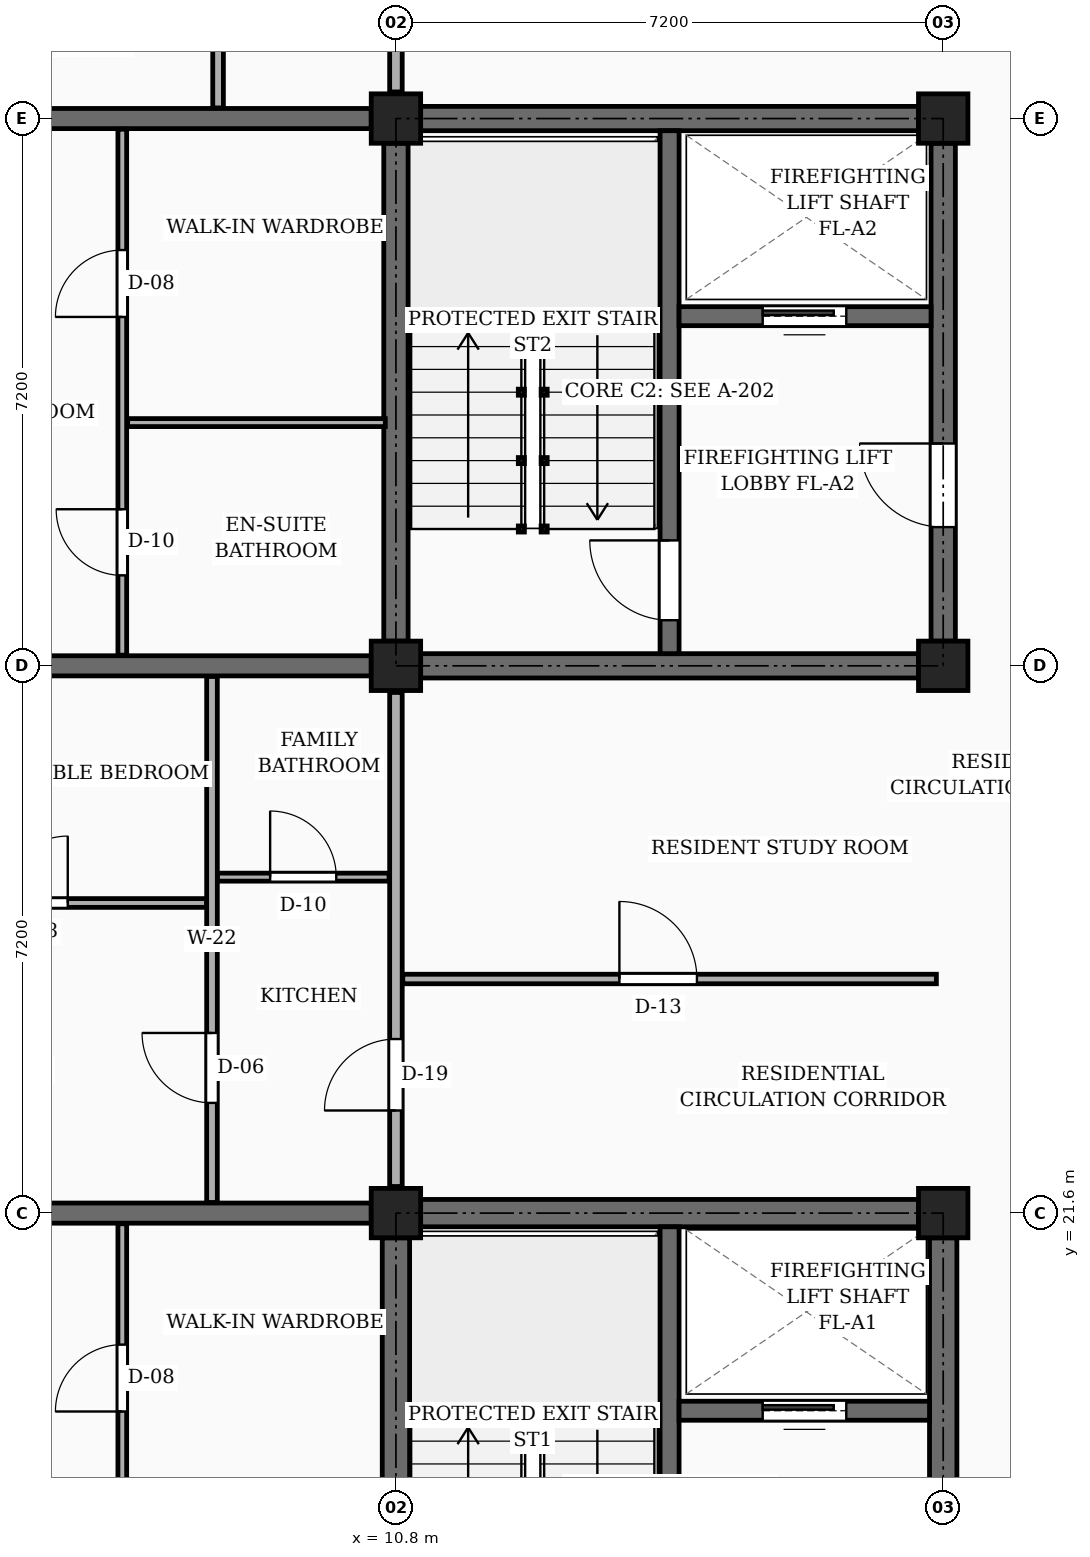
"""IFC4 building model, lengths in metres.
Left out: names, types, materials, properties, quantities, classifications, styles, units other than length and angle.
Written with IfcOpenShell. Run it as: python <this file> out.ifc"""

import sys

from ifc_helpers import new_model, si_unit, direction, frame, frame_2d, origin, origin_2d, place, context, subcontext, project, spatial, rectangle, extrude, element, fill, save


model = new_model("IFC4")
c1 = context("Model", 3, precision=1e-05, world=origin(), true_north=direction((0.0, 1.0)))
c2 = subcontext(c1, "Body", "Model", "MODEL_VIEW")
j1 = project(units=[si_unit("LENGTHUNIT", "METRE"), si_unit("PLANEANGLEUNIT", "RADIAN")], contexts=[c1])
p1 = place(None, origin())
s1 = spatial("IfcSite", under=j1, at=p1, CompositionType="ELEMENT")
p2 = place(p1, origin())
s2 = spatial("IfcBuilding", under=s1, at=p2, CompositionType="ELEMENT")
p3 = place(p2, frame((0.0, 0.0, 7.65)))
s3 = spatial("IfcBuildingStorey", under=s2, at=p3, CompositionType="ELEMENT", Elevation=7.65)
for number, where, z_axis, x_axis in (
    (1, (10.8, 21.6, 0.0), (0.0, 0.0, 1.0), (1.0, 0.0, 0.0)),
    (2, (10.8, 28.8, 0.0), (0.0, 0.0, 1.0), (1.0, 0.0, 0.0)),
    (3, (10.8, 36.0, 0.0), (0.0, 0.0, 1.0), (1.0, 0.0, 0.0)),
    (4, (18.0, 21.6, 0.0), (0.0, 0.0, 1.0), (1.0, 0.0, 0.0)),
    (5, (18.0, 28.8, 0.0), (0.0, 0.0, 1.0), (1.0, 0.0, 0.0)),
    (6, (18.0, 36.0, 0.0), (0.0, 0.0, 1.0), (1.0, 0.0, 0.0)),
):
    element("IfcColumn", number, at=place(p3, frame(where, z_axis=z_axis, x_axis=x_axis)), inside=s3, PredefinedType="COLUMN", context=c2, shape_type="SweptSolid", body=[
        extrude(rectangle(XDim=0.65, YDim=0.65, at=origin_2d()), origin(), (0.0, 0.0, 1.0), 3.15),
    ])
p4 = place(p3, frame((3.9, 21.6, 0.0), z_axis=(0.0, 0.0, 1.0), x_axis=(1.0, 0.0, 0.0)))
e7 = element("IfcWall", 7, at=p4, inside=s3, PredefinedType="SOLIDWALL", context=c2, shape_type="SweptSolid", body=[
    extrude(rectangle(XDim=6.575, YDim=0.265, at=frame_2d((3.288, 0.0))), origin(), (0.0, 0.0, 1.0), 2.17),
])
p5 = place(p3, frame((3.9, 28.8, 0.0), z_axis=(0.0, 0.0, 1.0), x_axis=(1.0, 0.0, 0.0)))
e8 = element("IfcWall", 8, at=p5, inside=s3, PredefinedType="SOLIDWALL", context=c2, shape_type="SweptSolid", body=[
    extrude(rectangle(XDim=6.575, YDim=0.265, at=frame_2d((3.288, 0.0))), origin(), (0.0, 0.0, 1.0), 2.17),
])
p6 = place(p5, frame((1.35, 0.0, 0.0)))
e9 = element("IfcOpeningElement", 9, at=p6, cuts=e8, PredefinedType="OPENING", context=c2, shape_type="SweptSolid", body=[
    extrude(rectangle(XDim=0.98, YDim=2.12, at=frame_2d((0.49, 1.06))), frame((0.0, 0.143, 0.0), z_axis=(0.0, -1.0, 0.0), x_axis=(1.0, 0.0, 0.0)), (0.0, 0.0, 1.0), 0.285),
])
p7 = place(p3, frame((3.9, 36.0, 0.0), z_axis=(0.0, 0.0, 1.0), x_axis=(1.0, 0.0, 0.0)))
e10 = element("IfcWall", 10, at=p7, inside=s3, PredefinedType="SOLIDWALL", context=c2, shape_type="SweptSolid", body=[
    extrude(rectangle(XDim=6.575, YDim=0.265, at=frame_2d((3.288, 0.0))), origin(), (0.0, 0.0, 1.0), 2.17),
])
p8 = place(p3, frame((10.8, 14.725, 0.0), z_axis=(0.0, 0.0, 1.0), x_axis=(0.0, 1.0, 0.0)))
e11 = element("IfcWall", 11, at=p8, inside=s3, PredefinedType="SHEAR", context=c2, shape_type="SweptSolid", body=[
    extrude(rectangle(XDim=6.55, YDim=0.36, at=frame_2d((3.275, 0.0))), origin(), (0.0, 0.0, 1.0), 2.87),
])
p9 = place(p3, frame((11.125, 21.6, 0.0), z_axis=(0.0, 0.0, 1.0), x_axis=(1.0, 0.0, 0.0)))
e12 = element("IfcWall", 12, at=p9, inside=s3, PredefinedType="SHEAR", context=c2, shape_type="SweptSolid", body=[
    extrude(rectangle(XDim=6.55, YDim=0.36, at=frame_2d((3.275, 0.0))), origin(), (0.0, 0.0, 1.0), 2.87),
])
p10 = place(p3, frame((18.0, 14.725, 0.0), z_axis=(0.0, 0.0, 1.0), x_axis=(0.0, 1.0, 0.0)))
e13 = element("IfcWall", 13, at=p10, inside=s3, PredefinedType="SHEAR", context=c2, shape_type="SweptSolid", body=[
    extrude(rectangle(XDim=6.55, YDim=0.36, at=frame_2d((3.275, 0.0))), origin(), (0.0, 0.0, 1.0), 2.87),
])
p11 = place(p10, frame((1.5, 0.0, 0.0)))
e14 = element("IfcOpeningElement", 14, at=p11, cuts=e13, PredefinedType="OPENING", context=c2, shape_type="SweptSolid", body=[
    extrude(rectangle(XDim=1.1, YDim=2.15, at=frame_2d((0.55, 1.075))), frame((0.0, 0.19, 0.0), z_axis=(0.0, -1.0, 0.0), x_axis=(1.0, 0.0, 0.0)), (0.0, 0.0, 1.0), 0.38),
])
p12 = place(p3, frame((14.4, 14.58, 0.0), z_axis=(0.0, 0.0, 1.0), x_axis=(0.0, 1.0, 0.0)))
e15 = element("IfcWall", 15, at=p12, inside=s3, PredefinedType="SHEAR", context=c2, shape_type="SweptSolid", body=[
    extrude(rectangle(XDim=6.84, YDim=0.25, at=frame_2d((3.42, 0.0))), origin(), (0.0, 0.0, 1.0), 2.87),
])
p13 = place(p12, frame((0.42, 0.0, 0.0)))
e16 = element("IfcOpeningElement", 16, at=p13, cuts=e15, PredefinedType="OPENING", context=c2, shape_type="SweptSolid", body=[
    extrude(rectangle(XDim=1.05, YDim=2.15, at=frame_2d((0.525, 1.075))), frame((0.0, 0.135, 0.0), z_axis=(0.0, -1.0, 0.0), x_axis=(1.0, 0.0, 0.0)), (0.0, 0.0, 1.0), 0.27),
])
p14 = place(p3, frame((14.525, 19.0, 0.0), z_axis=(0.0, 0.0, 1.0), x_axis=(1.0, 0.0, 0.0)))
e17 = element("IfcWall", 17, at=p14, inside=s3, PredefinedType="SHEAR", context=c2, shape_type="SweptSolid", body=[
    extrude(rectangle(XDim=3.295, YDim=0.25, at=frame_2d((1.647, 0.0))), origin(), (0.0, 0.0, 1.0), 2.87),
])
p15 = place(p14, frame((1.1, 0.0, 0.0)))
e18 = element("IfcOpeningElement", 18, at=p15, cuts=e17, PredefinedType="OPENING", context=c2, shape_type="SweptSolid", body=[
    extrude(rectangle(XDim=1.1, YDim=2.2, at=frame_2d((0.55, 1.1))), frame((0.0, 0.135, 0.0), z_axis=(0.0, -1.0, 0.0), x_axis=(1.0, 0.0, 0.0)), (0.0, 0.0, 1.0), 0.27),
])
for number, where, z_axis, x_axis in (
    (19, (10.8, 29.125, 0.0), (0.0, 0.0, 1.0), (0.0, 1.0, 0.0)),
    (20, (11.125, 36.0, 0.0), (0.0, 0.0, 1.0), (1.0, 0.0, 0.0)),
):
    element("IfcWall", number, at=place(p3, frame(where, z_axis=z_axis, x_axis=x_axis)), inside=s3, PredefinedType="SHEAR", context=c2, shape_type="SweptSolid", body=[
        extrude(rectangle(XDim=6.55, YDim=0.32, at=frame_2d((3.275, 0.0))), origin(), (0.0, 0.0, 1.0), 2.87),
    ])
p16 = place(p3, frame((18.0, 29.125, 0.0), z_axis=(0.0, 0.0, 1.0), x_axis=(0.0, 1.0, 0.0)))
e21 = element("IfcWall", 21, at=p16, inside=s3, PredefinedType="SHEAR", context=c2, shape_type="SweptSolid", body=[
    extrude(rectangle(XDim=6.55, YDim=0.32, at=frame_2d((3.275, 0.0))), origin(), (0.0, 0.0, 1.0), 2.87),
])
p17 = place(p16, frame((1.5, 0.0, 0.0)))
e22 = element("IfcOpeningElement", 22, at=p17, cuts=e21, PredefinedType="OPENING", context=c2, shape_type="SweptSolid", body=[
    extrude(rectangle(XDim=1.1, YDim=2.15, at=frame_2d((0.55, 1.075))), frame((0.0, 0.17, 0.0), z_axis=(0.0, -1.0, 0.0), x_axis=(1.0, 0.0, 0.0)), (0.0, 0.0, 1.0), 0.34),
])
p18 = place(p3, frame((11.125, 28.8, 0.0), z_axis=(0.0, 0.0, 1.0), x_axis=(1.0, 0.0, 0.0)))
e23 = element("IfcWall", 23, at=p18, inside=s3, PredefinedType="SHEAR", context=c2, shape_type="SweptSolid", body=[
    extrude(rectangle(XDim=6.55, YDim=0.32, at=frame_2d((3.275, 0.0))), origin(), (0.0, 0.0, 1.0), 2.87),
])
p19 = place(p3, frame((14.4, 28.96, 0.0), z_axis=(0.0, 0.0, 1.0), x_axis=(0.0, 1.0, 0.0)))
e24 = element("IfcWall", 24, at=p19, inside=s3, PredefinedType="SHEAR", context=c2, shape_type="SweptSolid", body=[
    extrude(rectangle(XDim=6.88, YDim=0.25, at=frame_2d((3.44, 0.0))), origin(), (0.0, 0.0, 1.0), 2.87),
])
p20 = place(p19, frame((0.44, 0.0, 0.0)))
e25 = element("IfcOpeningElement", 25, at=p20, cuts=e24, PredefinedType="OPENING", context=c2, shape_type="SweptSolid", body=[
    extrude(rectangle(XDim=1.05, YDim=2.15, at=frame_2d((0.525, 1.075))), frame((0.0, 0.135, 0.0), z_axis=(0.0, -1.0, 0.0), x_axis=(1.0, 0.0, 0.0)), (0.0, 0.0, 1.0), 0.27),
])
p21 = place(p3, frame((14.525, 33.4, 0.0), z_axis=(0.0, 0.0, 1.0), x_axis=(1.0, 0.0, 0.0)))
e26 = element("IfcWall", 26, at=p21, inside=s3, PredefinedType="SHEAR", context=c2, shape_type="SweptSolid", body=[
    extrude(rectangle(XDim=3.315, YDim=0.25, at=frame_2d((1.658, 0.0))), origin(), (0.0, 0.0, 1.0), 2.87),
])
p22 = place(p21, frame((1.1, 0.0, 0.0)))
e27 = element("IfcOpeningElement", 27, at=p22, cuts=e26, PredefinedType="OPENING", context=c2, shape_type="SweptSolid", body=[
    extrude(rectangle(XDim=1.1, YDim=2.2, at=frame_2d((0.55, 1.1))), frame((0.0, 0.135, 0.0), z_axis=(0.0, -1.0, 0.0), x_axis=(1.0, 0.0, 0.0)), (0.0, 0.0, 1.0), 0.27),
])
p23 = place(p3, frame((10.8, 21.95, 0.0), z_axis=(0.0, 0.0, 1.0), x_axis=(0.0, 1.0, 0.0)))
e28 = element("IfcWall", 28, at=p23, inside=s3, PredefinedType="PARTITIONING", context=c2, shape_type="SweptSolid", body=[
    extrude(rectangle(XDim=6.5, YDim=0.165, at=frame_2d((3.25, 0.0))), origin(), (0.0, 0.0, 1.0), 2.22),
])
p24 = place(p23, frame((1.0, 0.0, 0.0)))
e29 = element("IfcOpeningElement", 29, at=p24, cuts=e28, PredefinedType="OPENING", context=c2, shape_type="SweptSolid", body=[
    extrude(rectangle(XDim=0.94, YDim=2.12, at=frame_2d((0.47, 1.06))), frame((0.0, 0.093, 0.0), z_axis=(0.0, -1.0, 0.0), x_axis=(1.0, 0.0, 0.0)), (0.0, 0.0, 1.0), 0.185),
])
p25 = place(p3, frame((10.8, 36.35, 0.0), z_axis=(0.0, 0.0, 1.0), x_axis=(0.0, 1.0, 0.0)))
e30 = element("IfcWall", 30, at=p25, inside=s3, PredefinedType="PARTITIONING", context=c2, shape_type="SweptSolid", body=[
    extrude(rectangle(XDim=6.5, YDim=0.165, at=frame_2d((3.25, 0.0))), origin(), (0.0, 0.0, 1.0), 2.22),
])
p26 = place(p25, frame((1.0, 0.0, 0.0)))
e31 = element("IfcOpeningElement", 31, at=p26, cuts=e30, PredefinedType="OPENING", context=c2, shape_type="SweptSolid", body=[
    extrude(rectangle(XDim=1.14, YDim=2.18, at=frame_2d((0.57, 1.09))), frame((0.0, 0.093, 0.0), z_axis=(0.0, -1.0, 0.0), x_axis=(1.0, 0.0, 0.0)), (0.0, 0.0, 1.0), 0.185),
])
p27 = place(p3, frame((7.2, 14.54, 0.0), z_axis=(0.0, 0.0, 1.0), x_axis=(0.0, 1.0, 0.0)))
e32 = element("IfcWall", 32, at=p27, inside=s3, PredefinedType="PARTITIONING", context=c2, shape_type="SweptSolid", body=[
    extrude(rectangle(XDim=6.92, YDim=0.115, at=frame_2d((3.46, 0.0))), origin(), (0.0, 0.0, 1.0), 2.305),
])
p28 = place(p27, frame((1.05, 0.0, 0.0)))
e33 = element("IfcOpeningElement", 33, at=p28, cuts=e32, PredefinedType="OPENING", context=c2, shape_type="SweptSolid", body=[
    extrude(rectangle(XDim=0.87, YDim=2.05, at=frame_2d((0.435, 1.025))), frame((0.0, 0.067, 0.0), z_axis=(0.0, -1.0, 0.0), x_axis=(1.0, 0.0, 0.0)), (0.0, 0.0, 1.0), 0.135),
])
p29 = place(p27, frame((4.45, 0.0, 0.0)))
e34 = element("IfcOpeningElement", 34, at=p29, cuts=e32, PredefinedType="OPENING", context=c2, shape_type="SweptSolid", body=[
    extrude(rectangle(XDim=0.88, YDim=2.08, at=frame_2d((0.44, 1.04))), frame((0.0, 0.067, 0.0), z_axis=(0.0, -1.0, 0.0), x_axis=(1.0, 0.0, 0.0)), (0.0, 0.0, 1.0), 0.135),
])
p30 = place(p3, frame((10.89, 24.68, 0.0), z_axis=(0.0, 0.0, 1.0), x_axis=(1.0, 0.0, 0.0)))
e35 = element("IfcWall", 35, at=p30, inside=s3, PredefinedType="PARTITIONING", context=c2, shape_type="SweptSolid", body=[
    extrude(rectangle(XDim=7.02, YDim=0.125, at=frame_2d((3.51, 0.0))), origin(), (0.0, 0.0, 1.0), 2.305),
])
p31 = place(p30, frame((2.85, 0.0, 0.0)))
e36 = element("IfcOpeningElement", 36, at=p31, cuts=e35, PredefinedType="OPENING", context=c2, shape_type="SweptSolid", body=[
    extrude(rectangle(XDim=1.02, YDim=2.15, at=frame_2d((0.51, 1.075))), frame((0.0, 0.073, 0.0), z_axis=(0.0, -1.0, 0.0), x_axis=(1.0, 0.0, 0.0)), (0.0, 0.0, 1.0), 0.145),
])
p32 = place(p3, frame((3.775, 25.68, 0.0), z_axis=(0.0, 0.0, 1.0), x_axis=(1.0, 0.0, 0.0)))
e37 = element("IfcWall", 37, at=p32, inside=s3, PredefinedType="PARTITIONING", context=c2, shape_type="SweptSolid", body=[
    extrude(rectangle(XDim=4.535, YDim=0.115, at=frame_2d((2.268, 0.0))), origin(), (0.0, 0.0, 1.0), 2.305),
])
p33 = place(p32, frame((1.827, 0.0, 0.0)))
e38 = element("IfcOpeningElement", 38, at=p33, cuts=e37, PredefinedType="OPENING", context=c2, shape_type="SweptSolid", body=[
    extrude(rectangle(XDim=0.88, YDim=2.08, at=frame_2d((0.44, 1.04))), frame((0.0, 0.067, 0.0), z_axis=(0.0, -1.0, 0.0), x_axis=(1.0, 0.0, 0.0)), (0.0, 0.0, 1.0), 0.135),
])
p34 = place(p3, frame((8.45, 26.02, 0.0), z_axis=(0.0, 0.0, 1.0), x_axis=(1.0, 0.0, 0.0)))
e39 = element("IfcWall", 39, at=p34, inside=s3, PredefinedType="PARTITIONING", context=c2, shape_type="SweptSolid", body=[
    extrude(rectangle(XDim=2.26, YDim=0.105, at=frame_2d((1.13, 0.0))), origin(), (0.0, 0.0, 1.0), 2.305),
])
p35 = place(p34, frame((0.695, 0.0, 0.0)))
e40 = element("IfcOpeningElement", 40, at=p35, cuts=e39, PredefinedType="OPENING", context=c2, shape_type="SweptSolid", body=[
    extrude(rectangle(XDim=0.87, YDim=2.05, at=frame_2d((0.435, 1.025))), frame((0.0, 0.062, 0.0), z_axis=(0.0, -1.0, 0.0), x_axis=(1.0, 0.0, 0.0)), (0.0, 0.0, 1.0), 0.125),
])
p36 = place(p3, frame((8.38, 21.74, 0.0), z_axis=(0.0, 0.0, 1.0), x_axis=(0.0, 1.0, 0.0)))
e41 = element("IfcWall", 41, at=p36, inside=s3, PredefinedType="PARTITIONING", context=c2, shape_type="SweptSolid", body=[
    extrude(rectangle(XDim=6.92, YDim=0.14, at=frame_2d((3.46, 0.0))), origin(), (0.0, 0.0, 1.0), 2.305),
])
p37 = place(p36, frame((1.31, 0.0, 0.0)))
e42 = element("IfcOpeningElement", 42, at=p37, cuts=e41, PredefinedType="OPENING", context=c2, shape_type="SweptSolid", body=[
    extrude(rectangle(XDim=0.92, YDim=2.1, at=frame_2d((0.46, 1.05))), frame((0.0, 0.08, 0.0), z_axis=(0.0, -1.0, 0.0), x_axis=(1.0, 0.0, 0.0)), (0.0, 0.0, 1.0), 0.16),
])
p38 = place(p3, frame((7.2, 28.94, 0.0), z_axis=(0.0, 0.0, 1.0), x_axis=(0.0, 1.0, 0.0)))
e43 = element("IfcWall", 43, at=p38, inside=s3, PredefinedType="PARTITIONING", context=c2, shape_type="SweptSolid", body=[
    extrude(rectangle(XDim=6.92, YDim=0.115, at=frame_2d((3.46, 0.0))), origin(), (0.0, 0.0, 1.0), 2.305),
])
p39 = place(p38, frame((1.05, 0.0, 0.0)))
e44 = element("IfcOpeningElement", 44, at=p39, cuts=e43, PredefinedType="OPENING", context=c2, shape_type="SweptSolid", body=[
    extrude(rectangle(XDim=0.87, YDim=2.05, at=frame_2d((0.435, 1.025))), frame((0.0, 0.067, 0.0), z_axis=(0.0, -1.0, 0.0), x_axis=(1.0, 0.0, 0.0)), (0.0, 0.0, 1.0), 0.135),
])
p40 = place(p38, frame((4.45, 0.0, 0.0)))
e45 = element("IfcOpeningElement", 45, at=p40, cuts=e43, PredefinedType="OPENING", context=c2, shape_type="SweptSolid", body=[
    extrude(rectangle(XDim=0.88, YDim=2.08, at=frame_2d((0.44, 1.04))), frame((0.0, 0.067, 0.0), z_axis=(0.0, -1.0, 0.0), x_axis=(1.0, 0.0, 0.0)), (0.0, 0.0, 1.0), 0.135),
])
p41 = place(p3, frame((7.27, 32.0, 0.0), z_axis=(0.0, 0.0, 1.0), x_axis=(1.0, 0.0, 0.0)))
e46 = element("IfcWall", 46, at=p41, inside=s3, PredefinedType="PARTITIONING", context=c2, shape_type="SweptSolid", body=[
    extrude(rectangle(XDim=3.39, YDim=0.105, at=frame_2d((1.695, 0.0))), origin(), (0.0, 0.0, 1.0), 2.305),
])
p42 = place(p3, frame((8.46, 36.14, 0.0), z_axis=(0.0, 0.0, 1.0), x_axis=(0.0, 1.0, 0.0)))
e47 = element("IfcWall", 47, at=p42, inside=s3, PredefinedType="PARTITIONING", context=c2, shape_type="SweptSolid", body=[
    extrude(rectangle(XDim=6.92, YDim=0.14, at=frame_2d((3.46, 0.0))), origin(), (0.0, 0.0, 1.0), 2.305),
])
p43 = place(p42, frame((1.31, 0.0, 0.0)))
e48 = element("IfcOpeningElement", 48, at=p43, cuts=e47, PredefinedType="OPENING", context=c2, shape_type="SweptSolid", body=[
    extrude(rectangle(XDim=0.92, YDim=2.1, at=frame_2d((0.46, 1.05))), frame((0.0, 0.08, 0.0), z_axis=(0.0, -1.0, 0.0), x_axis=(1.0, 0.0, 0.0)), (0.0, 0.0, 1.0), 0.16),
])
p44 = place(p15, origin())
e49 = element("IfcDoor", 49, at=p44, inside=s3, OperationType="SLIDING_TO_LEFT", PredefinedType="DOOR", context=c2, shape_type="SweptSolid", body=[
    extrude(rectangle(XDim=1.1, YDim=2.2, at=frame_2d((0.55, 1.1))), frame((0.0, 0.025, 0.0), z_axis=(0.0, -1.0, 0.0), x_axis=(1.0, 0.0, 0.0)), (0.0, 0.0, 1.0), 0.05),
])
fill(e18, e49)
p45 = place(p17, frame((1.1, 0.0, 0.0), z_axis=(0.0, 0.0, 1.0), x_axis=(-1.0, 0.0, 0.0)))
e50 = element("IfcDoor", 50, at=p45, inside=s3, OperationType="SINGLE_SWING_RIGHT", PredefinedType="DOOR", context=c2, shape_type="SweptSolid", body=[
    extrude(rectangle(XDim=1.1, YDim=2.15, at=frame_2d((0.55, 1.075))), frame((0.0, 0.025, 0.0), z_axis=(0.0, -1.0, 0.0), x_axis=(1.0, 0.0, 0.0)), (0.0, 0.0, 1.0), 0.05),
])
fill(e22, e50)
p46 = place(p20, origin())
e51 = element("IfcDoor", 51, at=p46, inside=s3, OperationType="SINGLE_SWING_RIGHT", PredefinedType="DOOR", context=c2, shape_type="SweptSolid", body=[
    extrude(rectangle(XDim=1.05, YDim=2.15, at=frame_2d((0.525, 1.075))), frame((0.0, 0.025, 0.0), z_axis=(0.0, -1.0, 0.0), x_axis=(1.0, 0.0, 0.0)), (0.0, 0.0, 1.0), 0.05),
])
fill(e25, e51)
p47 = place(p22, origin())
e52 = element("IfcDoor", 52, at=p47, inside=s3, OperationType="SLIDING_TO_LEFT", PredefinedType="DOOR", context=c2, shape_type="SweptSolid", body=[
    extrude(rectangle(XDim=1.1, YDim=2.2, at=frame_2d((0.55, 1.1))), frame((0.0, 0.025, 0.0), z_axis=(0.0, -1.0, 0.0), x_axis=(1.0, 0.0, 0.0)), (0.0, 0.0, 1.0), 0.05),
])
fill(e27, e52)
p48 = place(p24, origin())
e53 = element("IfcDoor", 53, at=p48, inside=s3, OperationType="SINGLE_SWING_LEFT", PredefinedType="DOOR", context=c2, shape_type="SweptSolid", body=[
    extrude(rectangle(XDim=0.94, YDim=2.12, at=frame_2d((0.47, 1.06))), frame((0.0, 0.025, 0.0), z_axis=(0.0, -1.0, 0.0), x_axis=(1.0, 0.0, 0.0)), (0.0, 0.0, 1.0), 0.05),
])
fill(e29, e53)
p49 = place(p29, origin())
e54 = element("IfcDoor", 54, at=p49, inside=s3, OperationType="SINGLE_SWING_LEFT", PredefinedType="DOOR", context=c2, shape_type="SweptSolid", body=[
    extrude(rectangle(XDim=0.88, YDim=2.08, at=frame_2d((0.44, 1.04))), frame((0.0, 0.025, 0.0), z_axis=(0.0, -1.0, 0.0), x_axis=(1.0, 0.0, 0.0)), (0.0, 0.0, 1.0), 0.05),
])
fill(e34, e54)
p50 = place(p31, origin())
e55 = element("IfcDoor", 55, at=p50, inside=s3, OperationType="SINGLE_SWING_LEFT", PredefinedType="DOOR", context=c2, shape_type="SweptSolid", body=[
    extrude(rectangle(XDim=1.02, YDim=2.15, at=frame_2d((0.51, 1.075))), frame((0.0, 0.025, 0.0), z_axis=(0.0, -1.0, 0.0), x_axis=(1.0, 0.0, 0.0)), (0.0, 0.0, 1.0), 0.05),
])
fill(e36, e55)
p51 = place(p33, origin())
e56 = element("IfcDoor", 56, at=p51, inside=s3, OperationType="SINGLE_SWING_RIGHT", PredefinedType="DOOR", context=c2, shape_type="SweptSolid", body=[
    extrude(rectangle(XDim=0.88, YDim=2.08, at=frame_2d((0.44, 1.04))), frame((0.0, 0.025, 0.0), z_axis=(0.0, -1.0, 0.0), x_axis=(1.0, 0.0, 0.0)), (0.0, 0.0, 1.0), 0.05),
])
fill(e38, e56)
p52 = place(p35, origin())
e57 = element("IfcDoor", 57, at=p52, inside=s3, OperationType="SINGLE_SWING_LEFT", PredefinedType="DOOR", context=c2, shape_type="SweptSolid", body=[
    extrude(rectangle(XDim=0.87, YDim=2.05, at=frame_2d((0.435, 1.025))), frame((0.0, 0.025, 0.0), z_axis=(0.0, -1.0, 0.0), x_axis=(1.0, 0.0, 0.0)), (0.0, 0.0, 1.0), 0.05),
])
fill(e40, e57)
p53 = place(p37, origin())
e58 = element("IfcDoor", 58, at=p53, inside=s3, OperationType="SINGLE_SWING_RIGHT", PredefinedType="DOOR", context=c2, shape_type="SweptSolid", body=[
    extrude(rectangle(XDim=0.92, YDim=2.1, at=frame_2d((0.46, 1.05))), frame((0.0, 0.025, 0.0), z_axis=(0.0, -1.0, 0.0), x_axis=(1.0, 0.0, 0.0)), (0.0, 0.0, 1.0), 0.05),
])
fill(e42, e58)
p54 = place(p39, origin())
e59 = element("IfcDoor", 59, at=p54, inside=s3, OperationType="SINGLE_SWING_RIGHT", PredefinedType="DOOR", context=c2, shape_type="SweptSolid", body=[
    extrude(rectangle(XDim=0.87, YDim=2.05, at=frame_2d((0.435, 1.025))), frame((0.0, 0.025, 0.0), z_axis=(0.0, -1.0, 0.0), x_axis=(1.0, 0.0, 0.0)), (0.0, 0.0, 1.0), 0.05),
])
fill(e44, e59)
p55 = place(p40, origin())
e60 = element("IfcDoor", 60, at=p55, inside=s3, OperationType="SINGLE_SWING_LEFT", PredefinedType="DOOR", context=c2, shape_type="SweptSolid", body=[
    extrude(rectangle(XDim=0.88, YDim=2.08, at=frame_2d((0.44, 1.04))), frame((0.0, 0.025, 0.0), z_axis=(0.0, -1.0, 0.0), x_axis=(1.0, 0.0, 0.0)), (0.0, 0.0, 1.0), 0.05),
])
fill(e45, e60)
save(model, sys.argv[1])
